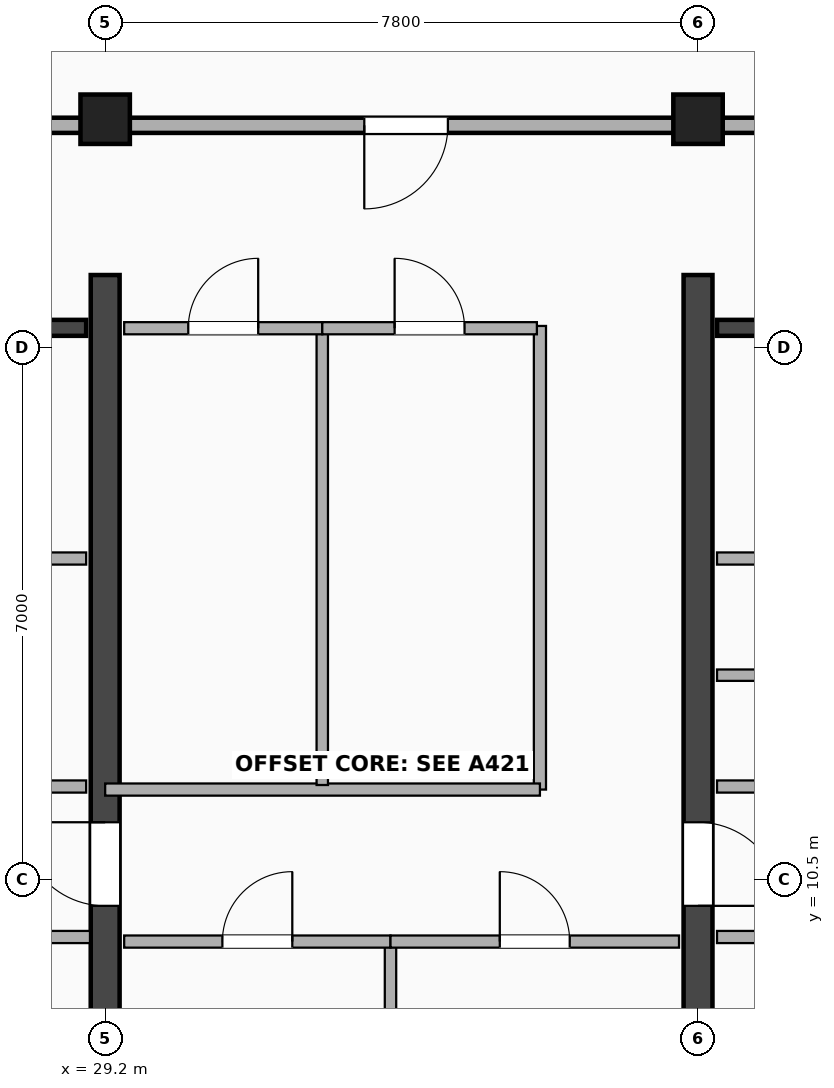
"""IFC4 building model, lengths in metres.
Left out: names, types, materials, properties, quantities, classifications, styles, units other than length and angle.
Written with IfcOpenShell. Run it as: python <this file> out.ifc"""

import sys

from ifc_helpers import new_model, si_unit, direction, frame, frame_2d, origin, origin_2d, place, context, subcontext, project, spatial, rectangle, extrude, element, fill, save


model = new_model("IFC4")
c1 = context("Model", 3, precision=1e-05, world=origin(), true_north=direction((0.0, 1.0)))
c2 = subcontext(c1, "Body", "Model", "MODEL_VIEW")
j1 = project(units=[si_unit("LENGTHUNIT", "METRE"), si_unit("PLANEANGLEUNIT", "RADIAN")], contexts=[c1])
p1 = place(None, origin())
s1 = spatial("IfcSite", under=j1, at=p1, CompositionType="ELEMENT")
p2 = place(p1, origin())
s2 = spatial("IfcBuilding", under=s1, at=p2, CompositionType="ELEMENT")
p3 = place(p2, frame((0.0, 0.0, 312.5)))
s3 = spatial("IfcBuildingStorey", under=s2, at=p3, CompositionType="ELEMENT", Elevation=312.5)
p4 = place(p3, frame((29.2, 3.5, 0.0), z_axis=(0.0, 0.0, 1.0), x_axis=(0.0, 1.0, 0.0)))
e1 = element("IfcWall", 1, at=p4, inside=s3, PredefinedType="SHEAR", context=c2, shape_type="SweptSolid", body=[
    extrude(rectangle(XDim=14.95, YDim=0.38, at=frame_2d((7.475, 0.0))), origin(), (0.0, 0.0, 1.0), 4.3),
])
p5 = place(p4, frame((7.75, 0.0, 0.0), z_axis=(0.0, 0.0, 1.0), x_axis=(-1.0, 0.0, 0.0)))
e2 = element("IfcOpeningElement", 2, at=p5, cuts=e1, PredefinedType="OPENING", context=c2, shape_type="SweptSolid", body=[
    extrude(rectangle(XDim=1.1, YDim=2.15, at=frame_2d((0.55, 1.075))), frame((0.0, 0.2, 0.0), z_axis=(0.0, -1.0, 0.0), x_axis=(1.0, 0.0, 0.0)), (0.0, 0.0, 1.0), 0.4),
])
p6 = place(p3, frame((37.0, 3.5, 0.0), z_axis=(0.0, 0.0, 1.0), x_axis=(0.0, 1.0, 0.0)))
e3 = element("IfcWall", 3, at=p6, inside=s3, PredefinedType="SHEAR", context=c2, shape_type="SweptSolid", body=[
    extrude(rectangle(XDim=14.95, YDim=0.38, at=frame_2d((7.475, 0.0))), origin(), (0.0, 0.0, 1.0), 4.3),
])
p7 = place(p6, frame((6.65, 0.0, 0.0)))
e4 = element("IfcOpeningElement", 4, at=p7, cuts=e3, PredefinedType="OPENING", context=c2, shape_type="SweptSolid", body=[
    extrude(rectangle(XDim=1.1, YDim=2.15, at=frame_2d((0.55, 1.075))), frame((0.0, 0.2, 0.0), z_axis=(0.0, -1.0, 0.0), x_axis=(1.0, 0.0, 0.0)), (0.0, 0.0, 1.0), 0.4),
])
p8 = place(p3, frame((20.65, 17.755, 0.0), z_axis=(0.0, 0.0, 1.0), x_axis=(1.0, 0.0, 0.0)))
e5 = element("IfcWall", 5, at=p8, inside=s3, PredefinedType="SHEAR", context=c2, shape_type="SweptSolid", body=[
    extrude(rectangle(XDim=8.3, YDim=0.21, at=frame_2d((4.15, 0.0))), origin(), (0.0, 0.0, 1.0), 4.3),
])
p9 = place(p8, frame((2.2, 0.0, 0.0), z_axis=(0.0, 0.0, 1.0), x_axis=(-1.0, 0.0, 0.0)))
e6 = element("IfcOpeningElement", 6, at=p9, cuts=e5, PredefinedType="OPENING", context=c2, shape_type="SweptSolid", body=[
    extrude(rectangle(XDim=1.05, YDim=2.15, at=frame_2d((0.525, 1.075))), frame((0.0, 0.115, 0.0), z_axis=(0.0, -1.0, 0.0), x_axis=(1.0, 0.0, 0.0)), (0.0, 0.0, 1.0), 0.23),
])
p10 = place(p8, frame((4.15, 0.0, 0.0)))
e7 = element("IfcOpeningElement", 7, at=p10, cuts=e5, PredefinedType="OPENING", context=c2, shape_type="SweptSolid", body=[
    extrude(rectangle(XDim=1.1, YDim=2.18, at=frame_2d((0.55, 1.09))), frame((0.0, 0.115, 0.0), z_axis=(0.0, -1.0, 0.0), x_axis=(1.0, 0.0, 0.0)), (0.0, 0.0, 1.0), 0.23),
])
p11 = place(p3, frame((37.25, 17.755, 0.0), z_axis=(0.0, 0.0, 1.0), x_axis=(1.0, 0.0, 0.0)))
e8 = element("IfcWall", 8, at=p11, inside=s3, PredefinedType="SHEAR", context=c2, shape_type="SweptSolid", body=[
    extrude(rectangle(XDim=7.2, YDim=0.21, at=frame_2d((3.6, 0.0))), origin(), (0.0, 0.0, 1.0), 4.3),
])
p12 = place(p11, frame((2.05, 0.0, 0.0)))
e9 = element("IfcOpeningElement", 9, at=p12, cuts=e8, PredefinedType="OPENING", context=c2, shape_type="SweptSolid", body=[
    extrude(rectangle(XDim=1.1, YDim=2.18, at=frame_2d((0.55, 1.09))), frame((0.0, 0.115, 0.0), z_axis=(0.0, -1.0, 0.0), x_axis=(1.0, 0.0, 0.0)), (0.0, 0.0, 1.0), 0.23),
])
p13 = place(p11, frame((5.78, 0.0, 0.0), z_axis=(0.0, 0.0, 1.0), x_axis=(-1.0, 0.0, 0.0)))
e10 = element("IfcOpeningElement", 10, at=p13, cuts=e8, PredefinedType="OPENING", context=c2, shape_type="SweptSolid", body=[
    extrude(rectangle(XDim=1.05, YDim=2.15, at=frame_2d((0.525, 1.075))), frame((0.0, 0.115, 0.0), z_axis=(0.0, -1.0, 0.0), x_axis=(1.0, 0.0, 0.0)), (0.0, 0.0, 1.0), 0.23),
])
for number, where, z_axis, x_axis in (
    (11, (29.2, 20.5, -0.3), (0.0, 0.0, 1.0), (1.0, 0.0, 0.0)),
    (12, (37.0, 20.5, -0.3), (0.0, 0.0, 1.0), (1.0, 0.0, 0.0)),
):
    element("IfcColumn", number, at=place(p3, frame(where, z_axis=z_axis, x_axis=x_axis)), inside=s3, PredefinedType="COLUMN", context=c2, shape_type="SweptSolid", body=[
        extrude(rectangle(XDim=0.65, YDim=0.65, at=origin_2d()), origin(), (0.0, 0.0, 1.0), 4.6),
    ])
p14 = place(p3, frame((24.22, 14.72, 0.0), z_axis=(0.0, 0.0, 1.0), x_axis=(1.0, 0.0, 0.0)))
e13 = element("IfcWall", 13, at=p14, inside=s3, PredefinedType="PARTITIONING", context=c2, shape_type="SweptSolid", body=[
    extrude(rectangle(XDim=4.73, YDim=0.16, at=frame_2d((2.365, 0.0))), origin(), (0.0, 0.0, 1.0), 4.3),
])
p15 = place(p3, frame((37.25, 14.72, 0.0), z_axis=(0.0, 0.0, 1.0), x_axis=(1.0, 0.0, 0.0)))
e14 = element("IfcWall", 14, at=p15, inside=s3, PredefinedType="PARTITIONING", context=c2, shape_type="SweptSolid", body=[
    extrude(rectangle(XDim=3.61, YDim=0.16, at=frame_2d((1.805, 0.0))), origin(), (0.0, 0.0, 1.0), 4.3),
])
p16 = place(p3, frame((26.38, 20.42, 0.0), z_axis=(0.0, 0.0, 1.0), x_axis=(1.0, 0.0, 0.0)))
e15 = element("IfcWall", 15, at=p16, inside=s3, PredefinedType="PARTITIONING", context=c2, shape_type="SweptSolid", body=[
    extrude(rectangle(XDim=2.82, YDim=0.2, at=frame_2d((1.41, 0.0))), origin(), (0.0, 0.0, 1.0), 3.885),
])
p17 = place(p3, frame((29.2, 20.42, 0.0), z_axis=(0.0, 0.0, 1.0), x_axis=(1.0, 0.0, 0.0)))
e16 = element("IfcWall", 16, at=p17, inside=s3, PredefinedType="PARTITIONING", context=c2, shape_type="SweptSolid", body=[
    extrude(rectangle(XDim=7.8, YDim=0.2, at=frame_2d((3.9, 0.0))), origin(), (0.0, 0.0, 1.0), 3.885),
])
p18 = place(p17, frame((3.409, 0.0, 0.0)))
e17 = element("IfcOpeningElement", 17, at=p18, cuts=e16, PredefinedType="OPENING", context=c2, shape_type="SweptSolid", body=[
    extrude(rectangle(XDim=1.1, YDim=2.15, at=frame_2d((0.55, 1.075))), frame((0.0, 0.11, 0.0), z_axis=(0.0, -1.0, 0.0), x_axis=(1.0, 0.0, 0.0)), (0.0, 0.0, 1.0), 0.22),
])
p19 = place(p3, frame((37.0, 20.42, 0.0), z_axis=(0.0, 0.0, 1.0), x_axis=(1.0, 0.0, 0.0)))
e18 = element("IfcWall", 18, at=p19, inside=s3, PredefinedType="PARTITIONING", context=c2, shape_type="SweptSolid", body=[
    extrude(rectangle(XDim=7.45, YDim=0.2, at=frame_2d((3.725, 0.0))), origin(), (0.0, 0.0, 1.0), 3.885),
])
p20 = place(p19, frame((4.2, 0.0, 0.0)))
e19 = element("IfcOpeningElement", 19, at=p20, cuts=e18, PredefinedType="OPENING", context=c2, shape_type="SweptSolid", body=[
    extrude(rectangle(XDim=1.1, YDim=2.15, at=frame_2d((0.55, 1.075))), frame((0.0, 0.11, 0.0), z_axis=(0.0, -1.0, 0.0), x_axis=(1.0, 0.0, 0.0)), (0.0, 0.0, 1.0), 0.22),
])
p21 = place(p3, frame((26.49, 11.72, 0.0), z_axis=(0.0, 0.0, 1.0), x_axis=(1.0, 0.0, 0.0)))
e20 = element("IfcWall", 20, at=p21, inside=s3, PredefinedType="PARTITIONING", context=c2, shape_type="SweptSolid", body=[
    extrude(rectangle(XDim=2.459, YDim=0.16, at=frame_2d((1.23, 0.0))), origin(), (0.0, 0.0, 1.0), 4.3),
])
p22 = place(p21, frame((0.77, 0.0, 0.0)))
e21 = element("IfcOpeningElement", 21, at=p22, cuts=e20, PredefinedType="OPENING", context=c2, shape_type="SweptSolid", body=[
    extrude(rectangle(XDim=0.92, YDim=2.08, at=frame_2d((0.46, 1.04))), frame((0.0, 0.09, 0.0), z_axis=(0.0, -1.0, 0.0), x_axis=(1.0, 0.0, 0.0)), (0.0, 0.0, 1.0), 0.18),
])
p23 = place(p3, frame((37.25, 11.72, 0.0), z_axis=(0.0, 0.0, 1.0), x_axis=(1.0, 0.0, 0.0)))
e22 = element("IfcWall", 22, at=p23, inside=s3, PredefinedType="PARTITIONING", context=c2, shape_type="SweptSolid", body=[
    extrude(rectangle(XDim=3.61, YDim=0.16, at=frame_2d((1.805, 0.0))), origin(), (0.0, 0.0, 1.0), 4.3),
])
p24 = place(p23, frame((1.345, 0.0, 0.0)))
e23 = element("IfcOpeningElement", 23, at=p24, cuts=e22, PredefinedType="OPENING", context=c2, shape_type="SweptSolid", body=[
    extrude(rectangle(XDim=0.92, YDim=2.08, at=frame_2d((0.46, 1.04))), frame((0.0, 0.09, 0.0), z_axis=(0.0, -1.0, 0.0), x_axis=(1.0, 0.0, 0.0)), (0.0, 0.0, 1.0), 0.18),
])
p25 = place(p3, frame((37.25, 13.185, 0.0), z_axis=(0.0, 0.0, 1.0), x_axis=(1.0, 0.0, 0.0)))
e24 = element("IfcWall", 24, at=p25, inside=s3, PredefinedType="PARTITIONING", context=c2, shape_type="SweptSolid", body=[
    extrude(rectangle(XDim=3.61, YDim=0.15, at=frame_2d((1.805, 0.0))), origin(), (0.0, 0.0, 1.0), 4.3),
])
p26 = place(p25, frame((1.365, 0.0, 0.0)))
e25 = element("IfcOpeningElement", 25, at=p26, cuts=e24, PredefinedType="OPENING", context=c2, shape_type="SweptSolid", body=[
    extrude(rectangle(XDim=0.88, YDim=2.08, at=frame_2d((0.44, 1.04))), frame((0.0, 0.085, 0.0), z_axis=(0.0, -1.0, 0.0), x_axis=(1.0, 0.0, 0.0)), (0.0, 0.0, 1.0), 0.17),
])
p27 = place(p3, frame((24.2, 9.74, 0.0), z_axis=(0.0, 0.0, 1.0), x_axis=(1.0, 0.0, 0.0)))
e26 = element("IfcWall", 26, at=p27, inside=s3, PredefinedType="PARTITIONING", context=c2, shape_type="SweptSolid", body=[
    extrude(rectangle(XDim=4.8, YDim=0.16, at=frame_2d((2.4, 0.0))), origin(), (0.0, 0.0, 1.0), 4.3),
])
p28 = place(p27, frame((2.75, 0.0, 0.0), z_axis=(0.0, 0.0, 1.0), x_axis=(-1.0, 0.0, 0.0)))
e27 = element("IfcOpeningElement", 27, at=p28, cuts=e26, PredefinedType="OPENING", context=c2, shape_type="SweptSolid", body=[
    extrude(rectangle(XDim=0.95, YDim=2.15, at=frame_2d((0.475, 1.075))), frame((0.0, 0.09, 0.0), z_axis=(0.0, -1.0, 0.0), x_axis=(1.0, 0.0, 0.0)), (0.0, 0.0, 1.0), 0.18),
])
p29 = place(p3, frame((37.25, 9.74, 0.0), z_axis=(0.0, 0.0, 1.0), x_axis=(1.0, 0.0, 0.0)))
e28 = element("IfcWall", 28, at=p29, inside=s3, PredefinedType="PARTITIONING", context=c2, shape_type="SweptSolid", body=[
    extrude(rectangle(XDim=3.73, YDim=0.16, at=frame_2d((1.865, 0.0))), origin(), (0.0, 0.0, 1.0), 4.3),
])
p30 = place(p29, frame((2.25, 0.0, 0.0), z_axis=(0.0, 0.0, 1.0), x_axis=(-1.0, 0.0, 0.0)))
e29 = element("IfcOpeningElement", 29, at=p30, cuts=e28, PredefinedType="OPENING", context=c2, shape_type="SweptSolid", body=[
    extrude(rectangle(XDim=0.95, YDim=2.15, at=frame_2d((0.475, 1.075))), frame((0.0, 0.09, 0.0), z_axis=(0.0, -1.0, 0.0), x_axis=(1.0, 0.0, 0.0)), (0.0, 0.0, 1.0), 0.18),
])
p31 = place(p3, frame((34.92, 11.68, 0.0), z_axis=(0.0, 0.0, 1.0), x_axis=(0.0, 1.0, 0.0)))
e30 = element("IfcWall", 30, at=p31, inside=s3, PredefinedType="PARTITIONING", context=c2, shape_type="SweptSolid", body=[
    extrude(rectangle(XDim=6.1, YDim=0.16, at=frame_2d((3.05, 0.0))), origin(), (0.0, 0.0, 1.0), 4.3),
])
p32 = place(p3, frame((32.954, 3.95, 0.0), z_axis=(0.0, 0.0, 1.0), x_axis=(0.0, 1.0, 0.0)))
e31 = element("IfcWall", 31, at=p32, inside=s3, PredefinedType="PARTITIONING", context=c2, shape_type="SweptSolid", body=[
    extrude(rectangle(XDim=5.73, YDim=0.15, at=frame_2d((2.865, 0.0))), origin(), (0.0, 0.0, 1.0), 4.3),
])
p33 = place(p3, frame((29.45, 9.68, 0.0), z_axis=(0.0, 0.0, 1.0), x_axis=(1.0, 0.0, 0.0)))
e32 = element("IfcWall", 32, at=p33, inside=s3, PredefinedType="PARTITIONING", context=c2, shape_type="SweptSolid", body=[
    extrude(rectangle(XDim=3.504, YDim=0.16, at=frame_2d((1.752, 0.0))), origin(), (0.0, 0.0, 1.0), 4.3),
])
p34 = place(p33, frame((2.212, 0.0, 0.0), z_axis=(0.0, 0.0, 1.0), x_axis=(-1.0, 0.0, 0.0)))
e33 = element("IfcOpeningElement", 33, at=p34, cuts=e32, PredefinedType="OPENING", context=c2, shape_type="SweptSolid", body=[
    extrude(rectangle(XDim=0.92, YDim=2.08, at=frame_2d((0.46, 1.04))), frame((0.0, 0.09, 0.0), z_axis=(0.0, -1.0, 0.0), x_axis=(1.0, 0.0, 0.0)), (0.0, 0.0, 1.0), 0.18),
])
p35 = place(p3, frame((32.954, 9.68, 0.0), z_axis=(0.0, 0.0, 1.0), x_axis=(1.0, 0.0, 0.0)))
e34 = element("IfcWall", 34, at=p35, inside=s3, PredefinedType="PARTITIONING", context=c2, shape_type="SweptSolid", body=[
    extrude(rectangle(XDim=3.796, YDim=0.16, at=frame_2d((1.898, 0.0))), origin(), (0.0, 0.0, 1.0), 4.3),
])
p36 = place(p35, frame((2.358, 0.0, 0.0), z_axis=(0.0, 0.0, 1.0), x_axis=(-1.0, 0.0, 0.0)))
e35 = element("IfcOpeningElement", 35, at=p36, cuts=e34, PredefinedType="OPENING", context=c2, shape_type="SweptSolid", body=[
    extrude(rectangle(XDim=0.92, YDim=2.08, at=frame_2d((0.46, 1.04))), frame((0.0, 0.09, 0.0), z_axis=(0.0, -1.0, 0.0), x_axis=(1.0, 0.0, 0.0)), (0.0, 0.0, 1.0), 0.18),
])
p37 = place(p3, frame((29.2, 11.68, 0.0), z_axis=(0.0, 0.0, 1.0), x_axis=(1.0, 0.0, 0.0)))
e36 = element("IfcWall", 36, at=p37, inside=s3, PredefinedType="PARTITIONING", context=c2, shape_type="SweptSolid", body=[
    extrude(rectangle(XDim=5.72, YDim=0.16, at=frame_2d((2.86, 0.0))), origin(), (0.0, 0.0, 1.0), 4.3),
])
p38 = place(p3, frame((32.056, 11.74, 0.0), z_axis=(0.0, 0.0, 1.0), x_axis=(0.0, 1.0, 0.0)))
e37 = element("IfcWall", 37, at=p38, inside=s3, PredefinedType="PARTITIONING", context=c2, shape_type="SweptSolid", body=[
    extrude(rectangle(XDim=6.01, YDim=0.15, at=frame_2d((3.005, 0.0))), origin(), (0.0, 0.0, 1.0), 4.3),
])
p39 = place(p3, frame((29.45, 17.75, 0.0), z_axis=(0.0, 0.0, 1.0), x_axis=(1.0, 0.0, 0.0)))
e38 = element("IfcWall", 38, at=p39, inside=s3, PredefinedType="PARTITIONING", context=c2, shape_type="SweptSolid", body=[
    extrude(rectangle(XDim=2.606, YDim=0.16, at=frame_2d((1.303, 0.0))), origin(), (0.0, 0.0, 1.0), 4.3),
])
p40 = place(p39, frame((1.763, 0.0, 0.0), z_axis=(0.0, 0.0, 1.0), x_axis=(-1.0, 0.0, 0.0)))
e39 = element("IfcOpeningElement", 39, at=p40, cuts=e38, PredefinedType="OPENING", context=c2, shape_type="SweptSolid", body=[
    extrude(rectangle(XDim=0.92, YDim=2.08, at=frame_2d((0.46, 1.04))), frame((0.0, 0.09, 0.0), z_axis=(0.0, -1.0, 0.0), x_axis=(1.0, 0.0, 0.0)), (0.0, 0.0, 1.0), 0.18),
])
p41 = place(p3, frame((32.056, 17.75, 0.0), z_axis=(0.0, 0.0, 1.0), x_axis=(1.0, 0.0, 0.0)))
e40 = element("IfcWall", 40, at=p41, inside=s3, PredefinedType="PARTITIONING", context=c2, shape_type="SweptSolid", body=[
    extrude(rectangle(XDim=2.823, YDim=0.16, at=frame_2d((1.412, 0.0))), origin(), (0.0, 0.0, 1.0), 4.3),
])
p42 = place(p41, frame((1.872, 0.0, 0.0), z_axis=(0.0, 0.0, 1.0), x_axis=(-1.0, 0.0, 0.0)))
e41 = element("IfcOpeningElement", 41, at=p42, cuts=e40, PredefinedType="OPENING", context=c2, shape_type="SweptSolid", body=[
    extrude(rectangle(XDim=0.92, YDim=2.08, at=frame_2d((0.46, 1.04))), frame((0.0, 0.09, 0.0), z_axis=(0.0, -1.0, 0.0), x_axis=(1.0, 0.0, 0.0)), (0.0, 0.0, 1.0), 0.18),
])
p43 = place(p5, origin())
e42 = element("IfcDoor", 42, at=p43, inside=s3, OperationType="SINGLE_SWING_RIGHT", PredefinedType="DOOR", context=c2, shape_type="SweptSolid", body=[
    extrude(rectangle(XDim=1.1, YDim=2.15, at=frame_2d((0.55, 1.075))), frame((0.0, 0.025, 0.0), z_axis=(0.0, -1.0, 0.0), x_axis=(1.0, 0.0, 0.0)), (0.0, 0.0, 1.0), 0.05),
])
fill(e2, e42)
p44 = place(p7, origin())
e43 = element("IfcDoor", 43, at=p44, inside=s3, OperationType="SINGLE_SWING_LEFT", PredefinedType="DOOR", context=c2, shape_type="SweptSolid", body=[
    extrude(rectangle(XDim=1.1, YDim=2.15, at=frame_2d((0.55, 1.075))), frame((0.0, 0.025, 0.0), z_axis=(0.0, -1.0, 0.0), x_axis=(1.0, 0.0, 0.0)), (0.0, 0.0, 1.0), 0.05),
])
fill(e4, e43)
p45 = place(p18, origin())
e44 = element("IfcDoor", 44, at=p45, inside=s3, OperationType="SINGLE_SWING_LEFT", PredefinedType="DOOR", context=c2, shape_type="SweptSolid", body=[
    extrude(rectangle(XDim=1.1, YDim=2.15, at=frame_2d((0.55, 1.075))), frame((0.0, 0.025, 0.0), z_axis=(0.0, -1.0, 0.0), x_axis=(1.0, 0.0, 0.0)), (0.0, 0.0, 1.0), 0.05),
])
fill(e17, e44)
p46 = place(p34, origin())
e45 = element("IfcDoor", 45, at=p46, inside=s3, OperationType="SINGLE_SWING_RIGHT", PredefinedType="DOOR", context=c2, shape_type="SweptSolid", body=[
    extrude(rectangle(XDim=0.92, YDim=2.08, at=frame_2d((0.46, 1.04))), frame((0.0, 0.025, 0.0), z_axis=(0.0, -1.0, 0.0), x_axis=(1.0, 0.0, 0.0)), (0.0, 0.0, 1.0), 0.05),
])
fill(e33, e45)
p47 = place(p36, origin())
e46 = element("IfcDoor", 46, at=p47, inside=s3, OperationType="SINGLE_SWING_LEFT", PredefinedType="DOOR", context=c2, shape_type="SweptSolid", body=[
    extrude(rectangle(XDim=0.92, YDim=2.08, at=frame_2d((0.46, 1.04))), frame((0.0, 0.025, 0.0), z_axis=(0.0, -1.0, 0.0), x_axis=(1.0, 0.0, 0.0)), (0.0, 0.0, 1.0), 0.05),
])
fill(e35, e46)
p48 = place(p40, origin())
e47 = element("IfcDoor", 47, at=p48, inside=s3, OperationType="SINGLE_SWING_RIGHT", PredefinedType="DOOR", context=c2, shape_type="SweptSolid", body=[
    extrude(rectangle(XDim=0.92, YDim=2.08, at=frame_2d((0.46, 1.04))), frame((0.0, 0.025, 0.0), z_axis=(0.0, -1.0, 0.0), x_axis=(1.0, 0.0, 0.0)), (0.0, 0.0, 1.0), 0.05),
])
fill(e39, e47)
p49 = place(p42, origin())
e48 = element("IfcDoor", 48, at=p49, inside=s3, OperationType="SINGLE_SWING_LEFT", PredefinedType="DOOR", context=c2, shape_type="SweptSolid", body=[
    extrude(rectangle(XDim=0.92, YDim=2.08, at=frame_2d((0.46, 1.04))), frame((0.0, 0.025, 0.0), z_axis=(0.0, -1.0, 0.0), x_axis=(1.0, 0.0, 0.0)), (0.0, 0.0, 1.0), 0.05),
])
fill(e41, e48)
save(model, sys.argv[1])
